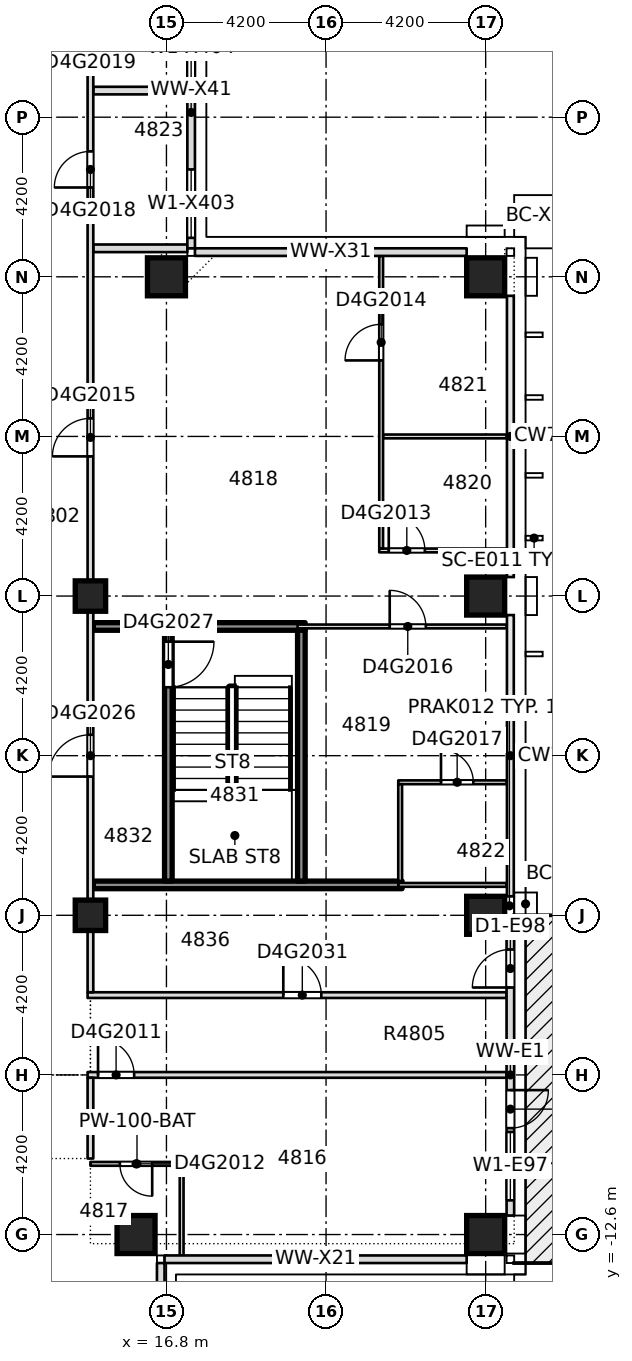
"""IFC4 building model, lengths in metres.
Left out: names, types, materials, properties, quantities, classifications, styles, units other than length and angle.
Written with IfcOpenShell. Run it as: python <this file> out.ifc"""

import sys

from ifc_helpers import new_model, si_unit, direction, frame, frame_2d, origin, origin_2d, place, context, subcontext, project, spatial, rectangle, extrude, element, fill, save


model = new_model("IFC4")
c1 = context("Model", 3, precision=1e-05, world=origin(), true_north=direction((0.0, 1.0)))
c2 = subcontext(c1, "Body", "Model", "MODEL_VIEW")
j1 = project(units=[si_unit("LENGTHUNIT", "METRE"), si_unit("PLANEANGLEUNIT", "RADIAN")], contexts=[c1])
p1 = place(None, origin())
s1 = spatial("IfcSite", under=j1, at=p1, CompositionType="ELEMENT")
p2 = place(p1, origin())
s2 = spatial("IfcBuilding", under=s1, at=p2, CompositionType="ELEMENT")
p3 = place(p2, frame((0.0, 0.0, 185.9)))
s3 = spatial("IfcBuildingStorey", under=s2, at=p3, CompositionType="ELEMENT", Elevation=185.9)
for number, where, z_axis, x_axis in (
    (1, (16.0, -12.6, -0.4), (0.0, 0.0, 1.0), (1.0, 0.0, 0.0)),
    (2, (25.2, -12.6, -0.4), (0.0, 0.0, 1.0), (1.0, 0.0, 0.0)),
    (3, (25.2, -4.2, -0.4), (0.0, 0.0, 1.0), (1.0, 0.0, 0.0)),
    (4, (25.2, 4.2, -0.4), (0.0, 0.0, 1.0), (1.0, 0.0, 0.0)),
    (5, (16.8, 12.6, -0.4), (0.0, 0.0, 1.0), (1.0, 0.0, 0.0)),
    (6, (25.2, 12.6, -0.4), (0.0, 0.0, 1.0), (1.0, 0.0, 0.0)),
):
    element("IfcColumn", number, at=place(p3, frame(where, z_axis=z_axis, x_axis=x_axis)), inside=s3, PredefinedType="COLUMN", context=c2, shape_type="SweptSolid", body=[
        extrude(rectangle(XDim=1.0, YDim=1.0, at=origin_2d()), origin(), (0.0, 0.0, 1.0), 3.45),
    ])
for number, where, z_axis, x_axis in (
    (7, (14.8, -4.2, -0.4), (0.0, 0.0, 1.0), (1.0, 0.0, 0.0)),
    (8, (14.8, 4.2, -0.4), (0.0, 0.0, 1.0), (1.0, 0.0, 0.0)),
):
    element("IfcColumn", number, at=place(p3, frame(where, z_axis=z_axis, x_axis=x_axis)), inside=s3, PredefinedType="COLUMN", context=c2, shape_type="SweptSolid", body=[
        extrude(rectangle(XDim=0.8, YDim=0.8, at=origin_2d()), origin(), (0.0, 0.0, 1.0), 3.45),
    ])
p4 = place(p3, frame((14.8, -10.74, 0.0), z_axis=(0.0, 0.0, 1.0), x_axis=(1.0, 0.0, 0.0)))
e9 = element("IfcWall", 9, at=p4, inside=s3, PredefinedType="PARTITIONING", context=c2, shape_type="SweptSolid", body=[
    extrude(rectangle(XDim=2.45, YDim=0.1, at=frame_2d((1.225, 0.0))), origin(), (0.0, 0.0, 1.0), 3.05),
])
p5 = place(p4, frame((0.775, 0.0, 0.0)))
e10 = element("IfcOpeningElement", 10, at=p5, cuts=e9, PredefinedType="OPENING", context=c2, shape_type="SweptSolid", body=[
    extrude(rectangle(XDim=0.85, YDim=2.1, at=frame_2d((0.425, 1.05))), frame((0.0, 0.06, 0.0), z_axis=(0.0, -1.0, 0.0), x_axis=(1.0, 0.0, 0.0)), (0.0, 0.0, 1.0), 0.12),
])
p6 = place(p3, frame((14.725, -8.4, 0.0), z_axis=(0.0, 0.0, 1.0), x_axis=(1.0, 0.0, 0.0)))
e11 = element("IfcWall", 11, at=p6, inside=s3, PredefinedType="PARTITIONING", context=c2, shape_type="SweptSolid", body=[
    extrude(rectangle(XDim=11.025, YDim=0.15, at=frame_2d((5.512, 0.0))), origin(), (0.0, 0.0, 1.0), 3.05),
])
p7 = place(p6, frame((0.275, 0.0, 0.0)))
e12 = element("IfcOpeningElement", 12, at=p7, cuts=e11, PredefinedType="OPENING", context=c2, shape_type="SweptSolid", body=[
    extrude(rectangle(XDim=0.95, YDim=2.1, at=frame_2d((0.475, 1.05))), frame((0.0, 0.085, 0.0), z_axis=(0.0, -1.0, 0.0), x_axis=(1.0, 0.0, 0.0)), (0.0, 0.0, 1.0), 0.17),
])
p8 = place(p3, frame((14.725, -6.3, 0.0), z_axis=(0.0, 0.0, 1.0), x_axis=(1.0, 0.0, 0.0)))
e13 = element("IfcWall", 13, at=p8, inside=s3, PredefinedType="PARTITIONING", context=c2, shape_type="SweptSolid", body=[
    extrude(rectangle(XDim=11.025, YDim=0.15, at=frame_2d((5.512, 0.0))), origin(), (0.0, 0.0, 1.0), 3.05),
])
p9 = place(p8, frame((5.15, 0.0, 0.0)))
e14 = element("IfcOpeningElement", 14, at=p9, cuts=e13, PredefinedType="OPENING", context=c2, shape_type="SweptSolid", body=[
    extrude(rectangle(XDim=1.0, YDim=2.1, at=frame_2d((0.5, 1.05))), frame((0.0, 0.085, 0.0), z_axis=(0.0, -1.0, 0.0), x_axis=(1.0, 0.0, 0.0)), (0.0, 0.0, 1.0), 0.17),
])
p10 = place(p3, frame((14.875, -3.4, 0.0), z_axis=(0.0, 0.0, 1.0), x_axis=(1.0, 0.0, 0.0)))
e15 = element("IfcWall", 15, at=p10, inside=s3, PredefinedType="SOLIDWALL", context=c2, shape_type="SweptSolid", body=[
    extrude(rectangle(XDim=8.125, YDim=0.2, at=frame_2d((4.062, 0.0))), origin(), (0.0, 0.0, 1.0), 3.05),
])
p11 = place(p3, frame((22.9, -3.4, 0.0), z_axis=(0.0, 0.0, 1.0), x_axis=(1.0, 0.0, 0.0)))
e16 = element("IfcWall", 16, at=p11, inside=s3, PredefinedType="PARTITIONING", context=c2, shape_type="SweptSolid", body=[
    extrude(rectangle(XDim=2.85, YDim=0.1, at=frame_2d((1.425, 0.0))), origin(), (0.0, 0.0, 1.0), 3.05),
])
p12 = place(p3, frame((22.9, -0.7, 0.0), z_axis=(0.0, 0.0, 1.0), x_axis=(1.0, 0.0, 0.0)))
e17 = element("IfcWall", 17, at=p12, inside=s3, PredefinedType="PARTITIONING", context=c2, shape_type="SweptSolid", body=[
    extrude(rectangle(XDim=2.85, YDim=0.1, at=frame_2d((1.425, 0.0))), origin(), (0.0, 0.0, 1.0), 3.05),
])
p13 = place(p12, frame((1.125, 0.0, 0.0)))
e18 = element("IfcOpeningElement", 18, at=p13, cuts=e17, PredefinedType="OPENING", context=c2, shape_type="SweptSolid", body=[
    extrude(rectangle(XDim=0.85, YDim=2.1, at=frame_2d((0.425, 1.05))), frame((0.0, 0.06, 0.0), z_axis=(0.0, -1.0, 0.0), x_axis=(1.0, 0.0, 0.0)), (0.0, 0.0, 1.0), 0.12),
])
p14 = place(p3, frame((14.875, 3.4, 0.0), z_axis=(0.0, 0.0, 1.0), x_axis=(1.0, 0.0, 0.0)))
e19 = element("IfcWall", 19, at=p14, inside=s3, PredefinedType="SOLIDWALL", context=c2, shape_type="SweptSolid", body=[
    extrude(rectangle(XDim=5.575, YDim=0.2, at=frame_2d((2.788, 0.0))), origin(), (0.0, 0.0, 1.0), 3.05),
])
p15 = place(p3, frame((20.25, 3.4, 0.0), z_axis=(0.0, 0.0, 1.0), x_axis=(1.0, 0.0, 0.0)))
e20 = element("IfcWall", 20, at=p15, inside=s3, PredefinedType="PARTITIONING", context=c2, shape_type="SweptSolid", body=[
    extrude(rectangle(XDim=5.5, YDim=0.1, at=frame_2d((2.75, 0.0))), origin(), (0.0, 0.0, 1.0), 3.05),
])
p16 = place(p15, frame((2.425, 0.0, 0.0)))
e21 = element("IfcOpeningElement", 21, at=p16, cuts=e20, PredefinedType="OPENING", context=c2, shape_type="SweptSolid", body=[
    extrude(rectangle(XDim=0.95, YDim=2.1, at=frame_2d((0.475, 1.05))), frame((0.0, 0.06, 0.0), z_axis=(0.0, -1.0, 0.0), x_axis=(1.0, 0.0, 0.0)), (0.0, 0.0, 1.0), 0.12),
])
p17 = place(p3, frame((22.4, 5.4, 0.0), z_axis=(0.0, 0.0, 1.0), x_axis=(1.0, 0.0, 0.0)))
e22 = element("IfcWall", 22, at=p17, inside=s3, PredefinedType="PARTITIONING", context=c2, shape_type="SweptSolid", body=[
    extrude(rectangle(XDim=3.35, YDim=0.1, at=frame_2d((1.675, 0.0))), origin(), (0.0, 0.0, 1.0), 3.05),
])
p18 = place(p17, frame((0.25, 0.0, 0.0)))
e23 = element("IfcOpeningElement", 23, at=p18, cuts=e22, PredefinedType="OPENING", context=c2, shape_type="SweptSolid", body=[
    extrude(rectangle(XDim=0.95, YDim=2.1, at=frame_2d((0.475, 1.05))), frame((0.0, 0.06, 0.0), z_axis=(0.0, -1.0, 0.0), x_axis=(1.0, 0.0, 0.0)), (0.0, 0.0, 1.0), 0.12),
])
p19 = place(p3, frame((22.5, 8.4, 0.0), z_axis=(0.0, 0.0, 1.0), x_axis=(1.0, 0.0, 0.0)))
e24 = element("IfcWall", 24, at=p19, inside=s3, PredefinedType="PARTITIONING", context=c2, shape_type="SweptSolid", body=[
    extrude(rectangle(XDim=3.25, YDim=0.1, at=frame_2d((1.625, 0.0))), origin(), (0.0, 0.0, 1.0), 3.05),
])
for number, where, z_axis, x_axis in (
    (25, (14.875, 13.35, 0.0), (0.0, 0.0, 1.0), (1.0, 0.0, 0.0)),
    (26, (14.875, 17.5, 0.0), (0.0, 0.0, 1.0), (1.0, 0.0, 0.0)),
):
    element("IfcWall", number, at=place(p3, frame(where, z_axis=z_axis, x_axis=x_axis)), inside=s3, PredefinedType="PARTITIONING", context=c2, shape_type="SweptSolid", body=[
        extrude(rectangle(XDim=2.475, YDim=0.2, at=frame_2d((1.238, 0.0))), origin(), (0.0, 0.0, 1.0), 3.05),
    ])
p20 = place(p3, frame((14.8, -10.6, 0.0), z_axis=(0.0, 0.0, 1.0), x_axis=(0.0, 1.0, 0.0)))
e27 = element("IfcWall", 27, at=p20, inside=s3, PredefinedType="PARTITIONING", context=c2, shape_type="SweptSolid", body=[
    extrude(rectangle(XDim=2.125, YDim=0.15, at=frame_2d((1.062, 0.0))), origin(), (0.0, 0.0, 1.0), 3.05),
])
p21 = place(p3, frame((14.8, -6.225, 0.0), z_axis=(0.0, 0.0, 1.0), x_axis=(0.0, 1.0, 0.0)))
e28 = element("IfcWall", 28, at=p21, inside=s3, PredefinedType="PARTITIONING", context=c2, shape_type="SweptSolid", body=[
    extrude(rectangle(XDim=27.775, YDim=0.15, at=frame_2d((13.888, 0.0))), origin(), (0.0, 0.0, 1.0), 3.05),
])
p22 = place(p21, frame((14.1, 0.0, 0.0)))
e29 = element("IfcOpeningElement", 29, at=p22, cuts=e28, PredefinedType="OPENING", context=c2, shape_type="SweptSolid", body=[
    extrude(rectangle(XDim=1.0, YDim=2.1, at=frame_2d((0.5, 1.05))), frame((0.0, 0.085, 0.0), z_axis=(0.0, -1.0, 0.0), x_axis=(1.0, 0.0, 0.0)), (0.0, 0.0, 1.0), 0.17),
])
p23 = place(p21, frame((21.175, 0.0, 0.0)))
e30 = element("IfcOpeningElement", 30, at=p23, cuts=e28, PredefinedType="OPENING", context=c2, shape_type="SweptSolid", body=[
    extrude(rectangle(XDim=0.95, YDim=2.1, at=frame_2d((0.475, 1.05))), frame((0.0, 0.085, 0.0), z_axis=(0.0, -1.0, 0.0), x_axis=(1.0, 0.0, 0.0)), (0.0, 0.0, 1.0), 0.17),
])
p24 = place(p21, frame((25.075, 0.0, 0.0)))
e31 = element("IfcOpeningElement", 31, at=p24, cuts=e28, PredefinedType="OPENING", context=c2, shape_type="SweptSolid", body=[
    extrude(rectangle(XDim=0.95, YDim=2.1, at=frame_2d((0.475, 1.05))), frame((0.0, 0.085, 0.0), z_axis=(0.0, -1.0, 0.0), x_axis=(1.0, 0.0, 0.0)), (0.0, 0.0, 1.0), 0.17),
])
p25 = place(p21, frame((5.675, 0.0, 0.0)))
e32 = element("IfcOpeningElement", 32, at=p25, cuts=e28, PredefinedType="OPENING", context=c2, shape_type="SweptSolid", body=[
    extrude(rectangle(XDim=1.1, YDim=2.1, at=frame_2d((0.55, 1.05))), frame((0.0, 0.085, 0.0), z_axis=(0.0, -1.0, 0.0), x_axis=(1.0, 0.0, 0.0)), (0.0, 0.0, 1.0), 0.17),
])
p26 = place(p3, frame((16.85, -3.3, 0.0), z_axis=(0.0, 0.0, 1.0), x_axis=(0.0, 1.0, 0.0)))
e33 = element("IfcWall", 33, at=p26, inside=s3, PredefinedType="SOLIDWALL", context=c2, shape_type="SweptSolid", body=[
    extrude(rectangle(XDim=6.6, YDim=0.2, at=frame_2d((3.3, 0.0))), origin(), (0.0, 0.0, 1.0), 3.05),
])
p27 = place(p26, frame((5.1, 0.0, 0.0)))
e34 = element("IfcOpeningElement", 34, at=p27, cuts=e33, PredefinedType="OPENING", context=c2, shape_type="SweptSolid", body=[
    extrude(rectangle(XDim=1.2, YDim=2.1, at=frame_2d((0.6, 1.05))), frame((0.0, 0.11, 0.0), z_axis=(0.0, -1.0, 0.0), x_axis=(1.0, 0.0, 0.0)), (0.0, 0.0, 1.0), 0.22),
])
p28 = place(p3, frame((17.2, -13.15, 0.0), z_axis=(0.0, 0.0, 1.0), x_axis=(0.0, 1.0, 0.0)))
e35 = element("IfcWall", 35, at=p28, inside=s3, PredefinedType="PARTITIONING", context=c2, shape_type="SweptSolid", body=[
    extrude(rectangle(XDim=2.36, YDim=0.1, at=frame_2d((1.18, 0.0))), origin(), (0.0, 0.0, 1.0), 3.05),
])
p29 = place(p3, frame((20.35, -3.3, 0.0), z_axis=(0.0, 0.0, 1.0), x_axis=(0.0, 1.0, 0.0)))
e36 = element("IfcWall", 36, at=p29, inside=s3, PredefinedType="SOLIDWALL", context=c2, shape_type="SweptSolid", body=[
    extrude(rectangle(XDim=6.6, YDim=0.2, at=frame_2d((3.3, 0.0))), origin(), (0.0, 0.0, 1.0), 3.05),
])
p30 = place(p3, frame((22.45, 5.45, 0.0), z_axis=(0.0, 0.0, 1.0), x_axis=(0.0, 1.0, 0.0)))
e37 = element("IfcWall", 37, at=p30, inside=s3, PredefinedType="PARTITIONING", context=c2, shape_type="SweptSolid", body=[
    extrude(rectangle(XDim=7.7, YDim=0.1, at=frame_2d((3.85, 0.0))), origin(), (0.0, 0.0, 1.0), 3.05),
])
p31 = place(p30, frame((4.95, 0.0, 0.0)))
e38 = element("IfcOpeningElement", 38, at=p31, cuts=e37, PredefinedType="OPENING", context=c2, shape_type="SweptSolid", body=[
    extrude(rectangle(XDim=0.95, YDim=2.1, at=frame_2d((0.475, 1.05))), frame((0.0, 0.06, 0.0), z_axis=(0.0, -1.0, 0.0), x_axis=(1.0, 0.0, 0.0)), (0.0, 0.0, 1.0), 0.12),
])
p32 = place(p3, frame((22.95, -3.3, 0.0), z_axis=(0.0, 0.0, 1.0), x_axis=(0.0, 1.0, 0.0)))
e39 = element("IfcWall", 39, at=p32, inside=s3, PredefinedType="PARTITIONING", context=c2, shape_type="SweptSolid", body=[
    extrude(rectangle(XDim=2.55, YDim=0.1, at=frame_2d((1.275, 0.0))), origin(), (0.0, 0.0, 1.0), 3.05),
])
p33 = place(p3, frame((16.65, -20.5, 0.0), z_axis=(0.0, 0.0, 1.0), x_axis=(0.0, 1.0, 0.0)))
e40 = element("IfcWall", 40, at=p33, inside=s3, PredefinedType="STANDARD", context=c2, shape_type="SweptSolid", body=[
    extrude(rectangle(XDim=7.15, YDim=0.2, at=frame_2d((3.575, 0.0))), origin(), (0.0, 0.0, 1.0), 3.05),
])
p34 = place(p33, frame((0.4, 0.0, 0.2)))
e41 = element("IfcOpeningElement", 41, at=p34, cuts=e40, PredefinedType="OPENING", context=c2, shape_type="SweptSolid", body=[
    extrude(rectangle(XDim=1.8, YDim=2.65, at=frame_2d((0.9, 1.325))), frame((0.0, 0.11, 0.0), z_axis=(0.0, -1.0, 0.0), x_axis=(1.0, 0.0, 0.0)), (0.0, 0.0, 1.0), 0.22),
])
p35 = place(p33, frame((3.975, 0.0, 0.2)))
e42 = element("IfcOpeningElement", 42, at=p35, cuts=e40, PredefinedType="OPENING", context=c2, shape_type="SweptSolid", body=[
    extrude(rectangle(XDim=1.8, YDim=2.65, at=frame_2d((0.9, 1.325))), frame((0.0, 0.11, 0.0), z_axis=(0.0, -1.0, 0.0), x_axis=(1.0, 0.0, 0.0)), (0.0, 0.0, 1.0), 0.22),
])
p36 = place(p3, frame((16.75, -13.25, 0.0), z_axis=(0.0, 0.0, 1.0), x_axis=(1.0, 0.0, 0.0)))
e43 = element("IfcWall", 43, at=p36, inside=s3, PredefinedType="STANDARD", context=c2, shape_type="SweptSolid", body=[
    extrude(rectangle(XDim=7.95, YDim=0.2, at=frame_2d((3.975, 0.0))), origin(), (0.0, 0.0, 1.0), 3.05),
])
p37 = place(p3, frame((25.85, -12.1, 0.0), z_axis=(0.0, 0.0, 1.0), x_axis=(0.0, 1.0, 0.0)))
e44 = element("IfcWall", 44, at=p37, inside=s3, PredefinedType="STANDARD", context=c2, shape_type="SweptSolid", body=[
    extrude(rectangle(XDim=7.4, YDim=0.2, at=frame_2d((3.7, 0.0))), origin(), (0.0, 0.0, 1.0), 3.05),
])
p38 = place(p37, frame((0.4, 0.0, 0.2)))
e45 = element("IfcOpeningElement", 45, at=p38, cuts=e44, PredefinedType="OPENING", context=c2, shape_type="SweptSolid", body=[
    extrude(rectangle(XDim=1.8, YDim=2.65, at=frame_2d((0.9, 1.325))), frame((0.0, 0.11, 0.0), z_axis=(0.0, -1.0, 0.0), x_axis=(1.0, 0.0, 0.0)), (0.0, 0.0, 1.0), 0.22),
])
p39 = place(p37, frame((2.3, 0.0, 0.0)))
e46 = element("IfcOpeningElement", 46, at=p39, cuts=e44, PredefinedType="OPENING", context=c2, shape_type="SweptSolid", body=[
    extrude(rectangle(XDim=1.0, YDim=2.4, at=frame_2d((0.5, 1.2))), frame((0.0, 0.11, 0.0), z_axis=(0.0, -1.0, 0.0), x_axis=(1.0, 0.0, 0.0)), (0.0, 0.0, 1.0), 0.22),
])
p40 = place(p37, frame((6.0, 0.0, 0.0)))
e47 = element("IfcOpeningElement", 47, at=p40, cuts=e44, PredefinedType="OPENING", context=c2, shape_type="SweptSolid", body=[
    extrude(rectangle(XDim=1.0, YDim=2.4, at=frame_2d((0.5, 1.2))), frame((0.0, 0.11, 0.0), z_axis=(0.0, -1.0, 0.0), x_axis=(1.0, 0.0, 0.0)), (0.0, 0.0, 1.0), 0.22),
])
p41 = place(p3, frame((24.7, 13.25, 0.0), z_axis=(0.0, 0.0, 1.0), x_axis=(-1.0, 0.0, 0.0)))
e48 = element("IfcWall", 48, at=p41, inside=s3, PredefinedType="STANDARD", context=c2, shape_type="SweptSolid", body=[
    extrude(rectangle(XDim=7.15, YDim=0.2, at=frame_2d((3.575, 0.0))), origin(), (0.0, 0.0, 1.0), 3.05),
])
p42 = place(p3, frame((17.45, 13.35, 0.0), z_axis=(0.0, 0.0, 1.0), x_axis=(0.0, 1.0, 0.0)))
e49 = element("IfcWall", 49, at=p42, inside=s3, PredefinedType="STANDARD", context=c2, shape_type="SweptSolid", body=[
    extrude(rectangle(XDim=7.15, YDim=0.2, at=frame_2d((3.575, 0.0))), origin(), (0.0, 0.0, 1.0), 3.05),
])
p43 = place(p42, frame((0.275, 0.0, 0.2)))
e50 = element("IfcOpeningElement", 50, at=p43, cuts=e49, PredefinedType="OPENING", context=c2, shape_type="SweptSolid", body=[
    extrude(rectangle(XDim=1.8, YDim=2.65, at=frame_2d((0.9, 1.325))), frame((0.0, 0.11, 0.0), z_axis=(0.0, -1.0, 0.0), x_axis=(1.0, 0.0, 0.0)), (0.0, 0.0, 1.0), 0.22),
])
p44 = place(p42, frame((4.37, 0.0, 0.2)))
e51 = element("IfcOpeningElement", 51, at=p44, cuts=e49, PredefinedType="OPENING", context=c2, shape_type="SweptSolid", body=[
    extrude(rectangle(XDim=1.8, YDim=2.65, at=frame_2d((0.9, 1.325))), frame((0.0, 0.11, 0.0), z_axis=(0.0, -1.0, 0.0), x_axis=(1.0, 0.0, 0.0)), (0.0, 0.0, 1.0), 0.22),
])
p45 = place(p7, origin())
e52 = element("IfcDoor", 52, at=p45, inside=s3, OperationType="SINGLE_SWING_RIGHT", PredefinedType="DOOR", context=c2, shape_type="SweptSolid", body=[
    extrude(rectangle(XDim=0.95, YDim=2.1, at=frame_2d((0.475, 1.05))), frame((0.0, 0.025, 0.0), z_axis=(0.0, -1.0, 0.0), x_axis=(1.0, 0.0, 0.0)), (0.0, 0.0, 1.0), 0.05),
])
fill(e12, e52)
p46 = place(p5, origin())
e53 = element("IfcDoor", 53, at=p46, inside=s3, OperationType="SINGLE_SWING_RIGHT", PredefinedType="DOOR", context=c2, shape_type="SweptSolid", body=[
    extrude(rectangle(XDim=0.85, YDim=2.1, at=frame_2d((0.425, 1.05))), frame((0.0, 0.025, 0.0), z_axis=(0.0, -1.0, 0.0), x_axis=(1.0, 0.0, 0.0)), (0.0, 0.0, 1.0), 0.05),
])
fill(e10, e53)
p47 = place(p18, origin())
e54 = element("IfcDoor", 54, at=p47, inside=s3, OperationType="SINGLE_SWING_LEFT", PredefinedType="DOOR", context=c2, shape_type="SweptSolid", body=[
    extrude(rectangle(XDim=0.95, YDim=2.1, at=frame_2d((0.475, 1.05))), frame((0.0, 0.025, 0.0), z_axis=(0.0, -1.0, 0.0), x_axis=(1.0, 0.0, 0.0)), (0.0, 0.0, 1.0), 0.05),
])
fill(e23, e54)
p48 = place(p31, origin())
e55 = element("IfcDoor", 55, at=p48, inside=s3, OperationType="SINGLE_SWING_LEFT", PredefinedType="DOOR", context=c2, shape_type="SweptSolid", body=[
    extrude(rectangle(XDim=0.95, YDim=2.1, at=frame_2d((0.475, 1.05))), frame((0.0, 0.025, 0.0), z_axis=(0.0, -1.0, 0.0), x_axis=(1.0, 0.0, 0.0)), (0.0, 0.0, 1.0), 0.05),
])
fill(e38, e55)
p49 = place(p22, origin())
e56 = element("IfcDoor", 56, at=p49, inside=s3, OperationType="SINGLE_SWING_RIGHT", PredefinedType="DOOR", context=c2, shape_type="SweptSolid", body=[
    extrude(rectangle(XDim=1.0, YDim=2.1, at=frame_2d((0.5, 1.05))), frame((0.0, 0.025, 0.0), z_axis=(0.0, -1.0, 0.0), x_axis=(1.0, 0.0, 0.0)), (0.0, 0.0, 1.0), 0.05),
])
fill(e29, e56)
p50 = place(p16, origin())
e57 = element("IfcDoor", 57, at=p50, inside=s3, OperationType="SINGLE_SWING_LEFT", PredefinedType="DOOR", context=c2, shape_type="SweptSolid", body=[
    extrude(rectangle(XDim=0.95, YDim=2.1, at=frame_2d((0.475, 1.05))), frame((0.0, 0.025, 0.0), z_axis=(0.0, -1.0, 0.0), x_axis=(1.0, 0.0, 0.0)), (0.0, 0.0, 1.0), 0.05),
])
fill(e21, e57)
p51 = place(p13, origin())
e58 = element("IfcDoor", 58, at=p51, inside=s3, OperationType="SINGLE_SWING_RIGHT", PredefinedType="DOOR", context=c2, shape_type="SweptSolid", body=[
    extrude(rectangle(XDim=0.85, YDim=2.1, at=frame_2d((0.425, 1.05))), frame((0.0, 0.025, 0.0), z_axis=(0.0, -1.0, 0.0), x_axis=(1.0, 0.0, 0.0)), (0.0, 0.0, 1.0), 0.05),
])
fill(e18, e58)
p52 = place(p23, origin())
e59 = element("IfcDoor", 59, at=p52, inside=s3, OperationType="SINGLE_SWING_LEFT", PredefinedType="DOOR", context=c2, shape_type="SweptSolid", body=[
    extrude(rectangle(XDim=0.95, YDim=2.1, at=frame_2d((0.475, 1.05))), frame((0.0, 0.025, 0.0), z_axis=(0.0, -1.0, 0.0), x_axis=(1.0, 0.0, 0.0)), (0.0, 0.0, 1.0), 0.05),
])
fill(e30, e59)
p53 = place(p25, origin())
e60 = element("IfcDoor", 60, at=p53, inside=s3, OperationType="SINGLE_SWING_LEFT", PredefinedType="DOOR", context=c2, shape_type="SweptSolid", body=[
    extrude(rectangle(XDim=1.1, YDim=2.1, at=frame_2d((0.55, 1.05))), frame((0.0, 0.025, 0.0), z_axis=(0.0, -1.0, 0.0), x_axis=(1.0, 0.0, 0.0)), (0.0, 0.0, 1.0), 0.05),
])
fill(e32, e60)
p54 = place(p27, origin())
e61 = element("IfcDoor", 61, at=p54, inside=s3, OperationType="SINGLE_SWING_LEFT", PredefinedType="DOOR", context=c2, shape_type="SweptSolid", body=[
    extrude(rectangle(XDim=1.2, YDim=2.1, at=frame_2d((0.6, 1.05))), frame((0.0, 0.025, 0.0), z_axis=(0.0, -1.0, 0.0), x_axis=(1.0, 0.0, 0.0)), (0.0, 0.0, 1.0), 0.05),
])
fill(e34, e61)
p55 = place(p9, origin())
e62 = element("IfcDoor", 62, at=p55, inside=s3, OperationType="SINGLE_SWING_RIGHT", PredefinedType="DOOR", context=c2, shape_type="SweptSolid", body=[
    extrude(rectangle(XDim=1.0, YDim=2.1, at=frame_2d((0.5, 1.05))), frame((0.0, 0.025, 0.0), z_axis=(0.0, -1.0, 0.0), x_axis=(1.0, 0.0, 0.0)), (0.0, 0.0, 1.0), 0.05),
])
fill(e14, e62)
p56 = place(p38, origin())
e63 = element("IfcWindow", 63, at=p56, inside=s3, PartitioningType="SINGLE_PANEL", PredefinedType="WINDOW", context=c2, shape_type="SweptSolid", body=[
    extrude(rectangle(XDim=1.8, YDim=2.65, at=frame_2d((0.9, 1.325))), frame((0.0, 0.03, 0.0), z_axis=(0.0, -1.0, 0.0), x_axis=(1.0, 0.0, 0.0)), (0.0, 0.0, 1.0), 0.06),
])
fill(e45, e63)
p57 = place(p39, origin())
e64 = element("IfcDoor", 64, at=p57, inside=s3, OperationType="SINGLE_SWING_LEFT", PredefinedType="DOOR", context=c2, shape_type="SweptSolid", body=[
    extrude(rectangle(XDim=1.0, YDim=2.4, at=frame_2d((0.5, 1.2))), frame((0.0, 0.025, 0.0), z_axis=(0.0, -1.0, 0.0), x_axis=(1.0, 0.0, 0.0)), (0.0, 0.0, 1.0), 0.05),
])
fill(e46, e64)
p58 = place(p40, origin())
e65 = element("IfcDoor", 65, at=p58, inside=s3, OperationType="SINGLE_SWING_LEFT", PredefinedType="DOOR", context=c2, shape_type="SweptSolid", body=[
    extrude(rectangle(XDim=1.0, YDim=2.4, at=frame_2d((0.5, 1.2))), frame((0.0, 0.025, 0.0), z_axis=(0.0, -1.0, 0.0), x_axis=(1.0, 0.0, 0.0)), (0.0, 0.0, 1.0), 0.05),
])
fill(e47, e65)
p59 = place(p43, origin())
e66 = element("IfcWindow", 66, at=p59, inside=s3, PartitioningType="SINGLE_PANEL", PredefinedType="WINDOW", context=c2, shape_type="SweptSolid", body=[
    extrude(rectangle(XDim=1.8, YDim=2.65, at=frame_2d((0.9, 1.325))), frame((0.0, 0.03, 0.0), z_axis=(0.0, -1.0, 0.0), x_axis=(1.0, 0.0, 0.0)), (0.0, 0.0, 1.0), 0.06),
])
fill(e50, e66)
p60 = place(p44, origin())
e67 = element("IfcWindow", 67, at=p60, inside=s3, PartitioningType="SINGLE_PANEL", PredefinedType="WINDOW", context=c2, shape_type="SweptSolid", body=[
    extrude(rectangle(XDim=1.8, YDim=2.65, at=frame_2d((0.9, 1.325))), frame((0.0, 0.03, 0.0), z_axis=(0.0, -1.0, 0.0), x_axis=(1.0, 0.0, 0.0)), (0.0, 0.0, 1.0), 0.06),
])
fill(e51, e67)
save(model, sys.argv[1])
